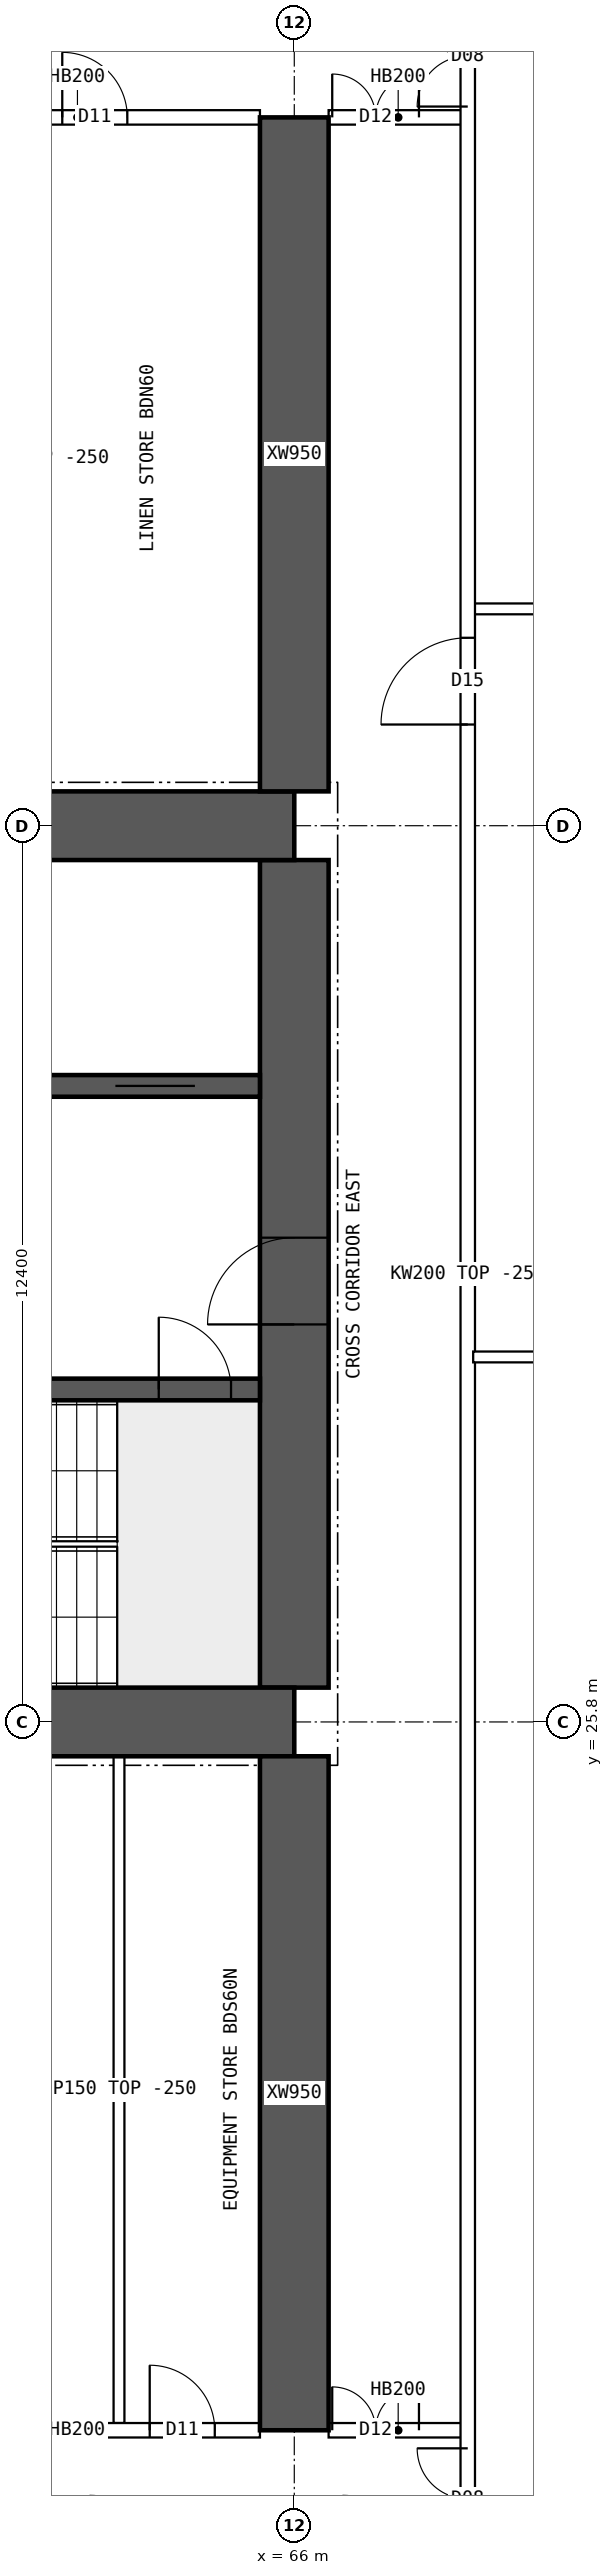
"""IFC4 building model, lengths in metres.
Left out: names, types, materials, properties, quantities, classifications, styles, units other than length and angle.
Written with IfcOpenShell. Run it as: python <this file> out.ifc"""

import sys

from ifc_helpers import new_model, si_unit, direction, frame, frame_2d, origin, place, context, subcontext, project, spatial, polyline, rectangle, outline, extrude, element, fill, save


model = new_model("IFC4")
c1 = context("Model", 3, precision=1e-05, world=origin(), true_north=direction((0.0, 1.0)))
c2 = subcontext(c1, "Body", "Model", "MODEL_VIEW")
j1 = project(units=[si_unit("LENGTHUNIT", "METRE"), si_unit("PLANEANGLEUNIT", "RADIAN")], contexts=[c1])
p1 = place(None, origin())
s1 = spatial("IfcSite", under=j1, at=p1, CompositionType="ELEMENT")
p2 = place(p1, origin())
s2 = spatial("IfcBuilding", under=s1, at=p2, CompositionType="ELEMENT")
p3 = place(p2, frame((0.0, 0.0, 88.15)))
s3 = spatial("IfcBuildingStorey", under=s2, at=p3, CompositionType="ELEMENT", Elevation=88.15)
for number, where, z_axis, x_axis in (
    (1, (18.0, 25.8, 0.0), (0.0, 0.0, 1.0), (1.0, 0.0, 0.0)),
    (2, (18.0, 38.2, 0.0), (0.0, 0.0, 1.0), (1.0, 0.0, 0.0)),
):
    element("IfcWall", number, at=place(p3, frame(where, z_axis=z_axis, x_axis=x_axis)), inside=s3, PredefinedType="SHEAR", context=c2, shape_type="SweptSolid", body=[
        extrude(rectangle(XDim=48.0, YDim=0.95, at=frame_2d((24.0, 0.0))), origin(), (0.0, 0.0, 1.0), 3.75),
    ])
p4 = place(p3, frame((66.0, 26.275, 0.0), z_axis=(0.0, 0.0, 1.0), x_axis=(0.0, 1.0, 0.0)))
e3 = element("IfcWall", 3, at=p4, inside=s3, PredefinedType="SHEAR", context=c2, shape_type="SweptSolid", body=[
    extrude(rectangle(XDim=11.45, YDim=0.95, at=frame_2d((5.725, 0.0))), origin(), (0.0, 0.0, 1.0), 3.75),
])
p5 = place(p4, frame((5.025, 0.0, 0.0)))
e4 = element("IfcOpeningElement", 4, at=p5, cuts=e3, PredefinedType="OPENING", context=c2, shape_type="SweptSolid", body=[
    extrude(rectangle(XDim=1.2, YDim=2.1, at=frame_2d((0.6, 1.05))), frame((0.0, 0.485, 0.0), z_axis=(0.0, -1.0, 0.0), x_axis=(1.0, 0.0, 0.0)), (0.0, 0.0, 1.0), 0.97),
])
p6 = place(p3, frame((18.475, 30.4, 0.0), z_axis=(0.0, 0.0, 1.0), x_axis=(1.0, 0.0, 0.0)))
e5 = element("IfcWall", 5, at=p6, inside=s3, PredefinedType="SHEAR", context=c2, shape_type="SweptSolid", body=[
    extrude(rectangle(XDim=47.05, YDim=0.3, at=frame_2d((23.525, 0.0))), origin(), (0.0, 0.0, 1.0), 3.75),
])
p7 = place(p6, frame((0.4, 0.0, 0.0)))
e6 = element("IfcOpeningElement", 6, at=p7, cuts=e5, PredefinedType="OPENING", context=c2, shape_type="SweptSolid", body=[
    extrude(rectangle(XDim=1.0, YDim=2.1, at=frame_2d((0.5, 1.05))), frame((0.0, 0.16, 0.0), z_axis=(0.0, -1.0, 0.0), x_axis=(1.0, 0.0, 0.0)), (0.0, 0.0, 1.0), 0.32),
])
p8 = place(p6, frame((45.65, 0.0, 0.0)))
e7 = element("IfcOpeningElement", 7, at=p8, cuts=e5, PredefinedType="OPENING", context=c2, shape_type="SweptSolid", body=[
    extrude(rectangle(XDim=1.0, YDim=2.1, at=frame_2d((0.5, 1.05))), frame((0.0, 0.16, 0.0), z_axis=(0.0, -1.0, 0.0), x_axis=(1.0, 0.0, 0.0)), (0.0, 0.0, 1.0), 0.32),
])
p9 = place(p6, frame((8.275, 0.0, 0.0)))
e8 = element("IfcOpeningElement", 8, at=p9, cuts=e5, PredefinedType="OPENING", context=c2, shape_type="SweptSolid", body=[
    extrude(rectangle(XDim=1.1, YDim=2.1, at=frame_2d((0.55, 1.05))), frame((0.0, 0.16, 0.0), z_axis=(0.0, -1.0, 0.0), x_axis=(1.0, 0.0, 0.0)), (0.0, 0.0, 1.0), 0.32),
])
p10 = place(p6, frame((10.875, 0.0, 0.0)))
e9 = element("IfcOpeningElement", 9, at=p10, cuts=e5, PredefinedType="OPENING", context=c2, shape_type="SweptSolid", body=[
    extrude(rectangle(XDim=1.1, YDim=2.1, at=frame_2d((0.55, 1.05))), frame((0.0, 0.16, 0.0), z_axis=(0.0, -1.0, 0.0), x_axis=(1.0, 0.0, 0.0)), (0.0, 0.0, 1.0), 0.32),
])
p11 = place(p6, frame((13.475, 0.0, 0.0)))
e10 = element("IfcOpeningElement", 10, at=p11, cuts=e5, PredefinedType="OPENING", context=c2, shape_type="SweptSolid", body=[
    extrude(rectangle(XDim=1.1, YDim=2.1, at=frame_2d((0.55, 1.05))), frame((0.0, 0.16, 0.0), z_axis=(0.0, -1.0, 0.0), x_axis=(1.0, 0.0, 0.0)), (0.0, 0.0, 1.0), 0.32),
])
p12 = place(p6, frame((16.075, 0.0, 0.0)))
e11 = element("IfcOpeningElement", 11, at=p12, cuts=e5, PredefinedType="OPENING", context=c2, shape_type="SweptSolid", body=[
    extrude(rectangle(XDim=1.1, YDim=2.1, at=frame_2d((0.55, 1.05))), frame((0.0, 0.16, 0.0), z_axis=(0.0, -1.0, 0.0), x_axis=(1.0, 0.0, 0.0)), (0.0, 0.0, 1.0), 0.32),
])
p13 = place(p6, frame((18.85, 0.0, 0.0)))
e12 = element("IfcOpeningElement", 12, at=p13, cuts=e5, PredefinedType="OPENING", context=c2, shape_type="SweptSolid", body=[
    extrude(rectangle(XDim=0.9, YDim=2.1, at=frame_2d((0.45, 1.05))), frame((0.0, 0.16, 0.0), z_axis=(0.0, -1.0, 0.0), x_axis=(1.0, 0.0, 0.0)), (0.0, 0.0, 1.0), 0.32),
])
p14 = place(p6, frame((30.142, 0.0, 0.0)))
e13 = element("IfcOpeningElement", 13, at=p14, cuts=e5, PredefinedType="OPENING", context=c2, shape_type="SweptSolid", body=[
    extrude(rectangle(XDim=1.1, YDim=2.1, at=frame_2d((0.55, 1.05))), frame((0.0, 0.16, 0.0), z_axis=(0.0, -1.0, 0.0), x_axis=(1.0, 0.0, 0.0)), (0.0, 0.0, 1.0), 0.32),
])
p15 = place(p6, frame((33.675, 0.0, 0.0)))
e14 = element("IfcOpeningElement", 14, at=p15, cuts=e5, PredefinedType="OPENING", context=c2, shape_type="SweptSolid", body=[
    extrude(rectangle(XDim=1.1, YDim=2.1, at=frame_2d((0.55, 1.05))), frame((0.0, 0.16, 0.0), z_axis=(0.0, -1.0, 0.0), x_axis=(1.0, 0.0, 0.0)), (0.0, 0.0, 1.0), 0.32),
])
p16 = place(p6, frame((37.208, 0.0, 0.0)))
e15 = element("IfcOpeningElement", 15, at=p16, cuts=e5, PredefinedType="OPENING", context=c2, shape_type="SweptSolid", body=[
    extrude(rectangle(XDim=1.1, YDim=2.1, at=frame_2d((0.55, 1.05))), frame((0.0, 0.16, 0.0), z_axis=(0.0, -1.0, 0.0), x_axis=(1.0, 0.0, 0.0)), (0.0, 0.0, 1.0), 0.32),
])
p17 = place(p3, frame((18.475, 34.6, 0.0), z_axis=(0.0, 0.0, 1.0), x_axis=(1.0, 0.0, 0.0)))
e16 = element("IfcWall", 16, at=p17, inside=s3, PredefinedType="SHEAR", context=c2, shape_type="SweptSolid", body=[
    extrude(rectangle(XDim=47.05, YDim=0.3, at=frame_2d((23.525, 0.0))), origin(), (0.0, 0.0, 1.0), 3.75),
])
p18 = place(p17, frame((0.9, 0.0, 0.0)))
e17 = element("IfcOpeningElement", 17, at=p18, cuts=e16, PredefinedType="OPENING", context=c2, shape_type="SweptSolid", body=[
    extrude(rectangle(XDim=1.1, YDim=2.1, at=frame_2d((0.55, 1.05))), frame((0.0, 0.16, 0.0), z_axis=(0.0, -1.0, 0.0), x_axis=(1.0, 0.0, 0.0)), (0.0, 0.0, 1.0), 0.32),
])
p19 = place(p17, frame((45.05, 0.0, 0.0)))
e18 = element("IfcOpeningElement", 18, at=p19, cuts=e16, PredefinedType="OPENING", context=c2, shape_type="SweptSolid", body=[
    extrude(rectangle(XDim=1.1, YDim=2.1, at=frame_2d((0.55, 1.05))), frame((0.0, 0.16, 0.0), z_axis=(0.0, -1.0, 0.0), x_axis=(1.0, 0.0, 0.0)), (0.0, 0.0, 1.0), 0.32),
])
p20 = place(p17, frame((4.125, 0.0, 0.0)))
e19 = element("IfcOpeningElement", 19, at=p20, cuts=e16, PredefinedType="OPENING", context=c2, shape_type="SweptSolid", body=[
    extrude(rectangle(XDim=0.9, YDim=2.1, at=frame_2d((0.45, 1.05))), frame((0.0, 0.16, 0.0), z_axis=(0.0, -1.0, 0.0), x_axis=(1.0, 0.0, 0.0)), (0.0, 0.0, 1.0), 0.32),
])
p21 = place(p17, frame((42.025, 0.0, 0.0)))
e20 = element("IfcOpeningElement", 20, at=p21, cuts=e16, PredefinedType="OPENING", context=c2, shape_type="SweptSolid", body=[
    extrude(rectangle(XDim=0.9, YDim=2.1, at=frame_2d((0.45, 1.05))), frame((0.0, 0.16, 0.0), z_axis=(0.0, -1.0, 0.0), x_axis=(1.0, 0.0, 0.0)), (0.0, 0.0, 1.0), 0.32),
])
p22 = place(p17, frame((8.9, 0.0, 0.0)))
e21 = element("IfcOpeningElement", 21, at=p22, cuts=e16, PredefinedType="OPENING", context=c2, shape_type="SweptSolid", body=[
    extrude(rectangle(XDim=0.9, YDim=2.1, at=frame_2d((0.45, 1.05))), frame((0.0, 0.16, 0.0), z_axis=(0.0, -1.0, 0.0), x_axis=(1.0, 0.0, 0.0)), (0.0, 0.0, 1.0), 0.32),
])
p23 = place(p17, frame((12.874, 0.0, 0.0)))
e22 = element("IfcOpeningElement", 22, at=p23, cuts=e16, PredefinedType="OPENING", context=c2, shape_type="SweptSolid", body=[
    extrude(rectangle(XDim=0.9, YDim=2.1, at=frame_2d((0.45, 1.05))), frame((0.0, 0.16, 0.0), z_axis=(0.0, -1.0, 0.0), x_axis=(1.0, 0.0, 0.0)), (0.0, 0.0, 1.0), 0.32),
])
p24 = place(p17, frame((16.521, 0.0, 0.0)))
e23 = element("IfcOpeningElement", 23, at=p24, cuts=e16, PredefinedType="OPENING", context=c2, shape_type="SweptSolid", body=[
    extrude(rectangle(XDim=0.9, YDim=2.1, at=frame_2d((0.45, 1.05))), frame((0.0, 0.16, 0.0), z_axis=(0.0, -1.0, 0.0), x_axis=(1.0, 0.0, 0.0)), (0.0, 0.0, 1.0), 0.32),
])
p25 = place(p17, frame((20.28, 0.0, 0.0)))
e24 = element("IfcOpeningElement", 24, at=p25, cuts=e16, PredefinedType="OPENING", context=c2, shape_type="SweptSolid", body=[
    extrude(rectangle(XDim=0.9, YDim=2.1, at=frame_2d((0.45, 1.05))), frame((0.0, 0.16, 0.0), z_axis=(0.0, -1.0, 0.0), x_axis=(1.0, 0.0, 0.0)), (0.0, 0.0, 1.0), 0.32),
])
p26 = place(p17, frame((24.686, 0.0, 0.0)))
e25 = element("IfcOpeningElement", 25, at=p26, cuts=e16, PredefinedType="OPENING", context=c2, shape_type="SweptSolid", body=[
    extrude(rectangle(XDim=0.9, YDim=2.1, at=frame_2d((0.45, 1.05))), frame((0.0, 0.16, 0.0), z_axis=(0.0, -1.0, 0.0), x_axis=(1.0, 0.0, 0.0)), (0.0, 0.0, 1.0), 0.32),
])
p27 = place(p17, frame((27.483, 0.0, 0.0)))
e26 = element("IfcOpeningElement", 26, at=p27, cuts=e16, PredefinedType="OPENING", context=c2, shape_type="SweptSolid", body=[
    extrude(rectangle(XDim=0.9, YDim=2.1, at=frame_2d((0.45, 1.05))), frame((0.0, 0.16, 0.0), z_axis=(0.0, -1.0, 0.0), x_axis=(1.0, 0.0, 0.0)), (0.0, 0.0, 1.0), 0.32),
])
p28 = place(p17, frame((33.604, 0.0, 0.0)))
e27 = element("IfcOpeningElement", 27, at=p28, cuts=e16, PredefinedType="OPENING", context=c2, shape_type="SweptSolid", body=[
    extrude(rectangle(XDim=0.9, YDim=2.1, at=frame_2d((0.45, 1.05))), frame((0.0, 0.16, 0.0), z_axis=(0.0, -1.0, 0.0), x_axis=(1.0, 0.0, 0.0)), (0.0, 0.0, 1.0), 0.32),
])
for number, where, z_axis, x_axis in (
    (28, (66.0, 16.0, 0.0), (0.0, 0.0, 1.0), (0.0, 1.0, 0.0)),
    (29, (66.0, 38.675, 0.0), (0.0, 0.0, 1.0), (0.0, 1.0, 0.0)),
):
    element("IfcWall", number, at=place(p3, frame(where, z_axis=z_axis, x_axis=x_axis)), inside=s3, PredefinedType="SHEAR", context=c2, shape_type="SweptSolid", body=[
        extrude(rectangle(XDim=9.325, YDim=0.95, at=frame_2d((4.663, 0.0))), origin(), (0.0, 0.0, 1.0), 3.75),
    ])
p29 = place(p3, frame((60.475, 16.0, 0.0), z_axis=(0.0, 0.0, 1.0), x_axis=(1.0, 0.0, 0.0)))
e30 = element("IfcWall", 30, at=p29, inside=s3, PredefinedType="SOLIDWALL", context=c2, shape_type="SweptSolid", body=[
    extrude(rectangle(XDim=5.05, YDim=0.2, at=frame_2d((2.525, 0.0))), origin(), (0.0, 0.0, 1.0), 3.5),
])
p30 = place(p29, frame((0.15, 0.0, 0.0)))
e31 = element("IfcOpeningElement", 31, at=p30, cuts=e30, PredefinedType="OPENING", context=c2, shape_type="SweptSolid", body=[
    extrude(rectangle(XDim=0.9, YDim=2.1, at=frame_2d((0.45, 1.05))), frame((0.0, 0.11, 0.0), z_axis=(0.0, -1.0, 0.0), x_axis=(1.0, 0.0, 0.0)), (0.0, 0.0, 1.0), 0.22),
])
p31 = place(p29, frame((3.525, 0.0, 0.0)))
e32 = element("IfcOpeningElement", 32, at=p31, cuts=e30, PredefinedType="OPENING", context=c2, shape_type="SweptSolid", body=[
    extrude(rectangle(XDim=0.9, YDim=2.1, at=frame_2d((0.45, 1.05))), frame((0.0, 0.11, 0.0), z_axis=(0.0, -1.0, 0.0), x_axis=(1.0, 0.0, 0.0)), (0.0, 0.0, 1.0), 0.22),
])
p32 = place(p3, frame((66.475, 16.0, 0.0), z_axis=(0.0, 0.0, 1.0), x_axis=(1.0, 0.0, 0.0)))
e33 = element("IfcWall", 33, at=p32, inside=s3, PredefinedType="SOLIDWALL", context=c2, shape_type="SweptSolid", body=[
    extrude(rectangle(XDim=1.925, YDim=0.2, at=frame_2d((0.962, 0.0))), origin(), (0.0, 0.0, 1.0), 3.5),
])
p33 = place(p32, frame((0.05, 0.0, 0.0)))
e34 = element("IfcOpeningElement", 34, at=p33, cuts=e33, PredefinedType="OPENING", context=c2, shape_type="SweptSolid", body=[
    extrude(rectangle(XDim=1.2, YDim=2.1, at=frame_2d((0.6, 1.05))), frame((0.0, 0.11, 0.0), z_axis=(0.0, -1.0, 0.0), x_axis=(1.0, 0.0, 0.0)), (0.0, 0.0, 1.0), 0.22),
])
p34 = place(p3, frame((60.475, 48.0, 0.0), z_axis=(0.0, 0.0, 1.0), x_axis=(1.0, 0.0, 0.0)))
e35 = element("IfcWall", 35, at=p34, inside=s3, PredefinedType="SOLIDWALL", context=c2, shape_type="SweptSolid", body=[
    extrude(rectangle(XDim=5.05, YDim=0.2, at=frame_2d((2.525, 0.0))), origin(), (0.0, 0.0, 1.0), 3.5),
])
p35 = place(p34, frame((0.15, 0.0, 0.0)))
e36 = element("IfcOpeningElement", 36, at=p35, cuts=e35, PredefinedType="OPENING", context=c2, shape_type="SweptSolid", body=[
    extrude(rectangle(XDim=0.9, YDim=2.1, at=frame_2d((0.45, 1.05))), frame((0.0, 0.11, 0.0), z_axis=(0.0, -1.0, 0.0), x_axis=(1.0, 0.0, 0.0)), (0.0, 0.0, 1.0), 0.22),
])
p36 = place(p34, frame((2.315, 0.0, 0.0)))
e37 = element("IfcOpeningElement", 37, at=p36, cuts=e35, PredefinedType="OPENING", context=c2, shape_type="SweptSolid", body=[
    extrude(rectangle(XDim=0.9, YDim=2.1, at=frame_2d((0.45, 1.05))), frame((0.0, 0.11, 0.0), z_axis=(0.0, -1.0, 0.0), x_axis=(1.0, 0.0, 0.0)), (0.0, 0.0, 1.0), 0.22),
])
p37 = place(p3, frame((66.475, 48.0, 0.0), z_axis=(0.0, 0.0, 1.0), x_axis=(1.0, 0.0, 0.0)))
e38 = element("IfcWall", 38, at=p37, inside=s3, PredefinedType="SOLIDWALL", context=c2, shape_type="SweptSolid", body=[
    extrude(rectangle(XDim=1.925, YDim=0.2, at=frame_2d((0.962, 0.0))), origin(), (0.0, 0.0, 1.0), 3.5),
])
p38 = place(p37, frame((0.05, 0.0, 0.0)))
e39 = element("IfcOpeningElement", 39, at=p38, cuts=e38, PredefinedType="OPENING", context=c2, shape_type="SweptSolid", body=[
    extrude(rectangle(XDim=1.2, YDim=2.1, at=frame_2d((0.6, 1.05))), frame((0.0, 0.11, 0.0), z_axis=(0.0, -1.0, 0.0), x_axis=(1.0, 0.0, 0.0)), (0.0, 0.0, 1.0), 0.22),
])
p39 = place(p3, frame((63.575, 16.1, 0.0), z_axis=(0.0, 0.0, 1.0), x_axis=(0.0, 1.0, 0.0)))
e40 = element("IfcWall", 40, at=p39, inside=s3, PredefinedType="PARTITIONING", context=c2, shape_type="SweptSolid", body=[
    extrude(rectangle(XDim=9.225, YDim=0.15, at=frame_2d((4.612, 0.0))), origin(), (0.0, 0.0, 1.0), 3.5),
])
p40 = place(p3, frame((68.475, 30.85, 0.0), z_axis=(0.0, 0.0, 1.0), x_axis=(1.0, 0.0, 0.0)))
e41 = element("IfcWall", 41, at=p40, inside=s3, PredefinedType="PARTITIONING", context=c2, shape_type="SweptSolid", body=[
    extrude(outline(polyline([(0.0, 0.0), (6.82, 0.0), (6.82, 3.5), (3.827, 3.5), (3.825, 3.05), (3.227, 3.05), (3.225, 3.5), (0.0, 3.5), (0.0, 0.0)])), frame((0.0, 0.075, 0.0), z_axis=(0.0, -1.0, 0.0), x_axis=(1.0, 0.0, 0.0)), (0.0, 0.0, 1.0), 0.15),
])
p41 = place(p3, frame((68.4, 9.405, 0.0), z_axis=(0.0, 0.0, 1.0), x_axis=(0.0, 1.0, 0.0)))
e42 = element("IfcWall", 42, at=p41, inside=s3, PredefinedType="SOLIDWALL", context=c2, shape_type="SweptSolid", body=[
    extrude(rectangle(XDim=45.189, YDim=0.2, at=frame_2d((22.595, 0.0))), origin(), (0.0, 0.0, 1.0), 3.5),
])
p42 = place(p41, frame((30.195, 0.0, 0.0)))
e43 = element("IfcOpeningElement", 43, at=p42, cuts=e42, PredefinedType="OPENING", context=c2, shape_type="SweptSolid", body=[
    extrude(rectangle(XDim=1.2, YDim=2.1, at=frame_2d((0.6, 1.05))), frame((0.0, 0.11, 0.0), z_axis=(0.0, -1.0, 0.0), x_axis=(1.0, 0.0, 0.0)), (0.0, 0.0, 1.0), 0.22),
])
p43 = place(p41, frame((4.945, 0.0, 0.0)))
e44 = element("IfcOpeningElement", 44, at=p43, cuts=e42, PredefinedType="OPENING", context=c2, shape_type="SweptSolid", body=[
    extrude(rectangle(XDim=1.4, YDim=2.1, at=frame_2d((0.7, 1.05))), frame((0.0, 0.11, 0.0), z_axis=(0.0, -1.0, 0.0), x_axis=(1.0, 0.0, 0.0)), (0.0, 0.0, 1.0), 0.22),
])
p44 = place(p41, frame((38.745, 0.0, 0.0)))
e45 = element("IfcOpeningElement", 45, at=p44, cuts=e42, PredefinedType="OPENING", context=c2, shape_type="SweptSolid", body=[
    extrude(rectangle(XDim=1.4, YDim=2.1, at=frame_2d((0.7, 1.05))), frame((0.0, 0.11, 0.0), z_axis=(0.0, -1.0, 0.0), x_axis=(1.0, 0.0, 0.0)), (0.0, 0.0, 1.0), 0.22),
])
p45 = place(p3, frame((68.475, 41.2, 0.0), z_axis=(0.0, 0.0, 1.0), x_axis=(1.0, 0.0, 0.0)))
e46 = element("IfcWall", 46, at=p45, inside=s3, PredefinedType="PARTITIONING", context=c2, shape_type="SweptSolid", body=[
    extrude(outline(polyline([(0.0, 0.0), (6.82, 0.0), (6.82, 3.5), (3.827, 3.5), (3.825, 3.05), (3.227, 3.05), (3.225, 3.5), (0.0, 3.5), (0.0, 0.0)])), frame((0.0, 0.075, 0.0), z_axis=(0.0, -1.0, 0.0), x_axis=(1.0, 0.0, 0.0)), (0.0, 0.0, 1.0), 0.15),
])
p46 = place(p5, origin())
e47 = element("IfcDoor", 47, at=p46, inside=s3, OperationType="SINGLE_SWING_LEFT", PredefinedType="DOOR", context=c2, shape_type="SweptSolid", body=[
    extrude(rectangle(XDim=1.2, YDim=2.1, at=frame_2d((0.6, 1.05))), frame((0.0, 0.025, 0.0), z_axis=(0.0, -1.0, 0.0), x_axis=(1.0, 0.0, 0.0)), (0.0, 0.0, 1.0), 0.05),
])
fill(e4, e47)
p47 = place(p8, origin())
e48 = element("IfcDoor", 48, at=p47, inside=s3, OperationType="SINGLE_SWING_LEFT", PredefinedType="DOOR", context=c2, shape_type="SweptSolid", body=[
    extrude(rectangle(XDim=1.0, YDim=2.1, at=frame_2d((0.5, 1.05))), frame((0.0, 0.025, 0.0), z_axis=(0.0, -1.0, 0.0), x_axis=(1.0, 0.0, 0.0)), (0.0, 0.0, 1.0), 0.05),
])
fill(e7, e48)
p48 = place(p19, origin())
e49 = element("IfcDoor", 49, at=p48, inside=s3, OperationType="DOUBLE_DOOR_SLIDING", PredefinedType="DOOR", context=c2, shape_type="SweptSolid", body=[
    extrude(rectangle(XDim=1.1, YDim=2.1, at=frame_2d((0.55, 1.05))), frame((0.0, 0.025, 0.0), z_axis=(0.0, -1.0, 0.0), x_axis=(1.0, 0.0, 0.0)), (0.0, 0.0, 1.0), 0.05),
])
fill(e18, e49)
p49 = place(p33, origin())
e50 = element("IfcDoor", 50, at=p49, inside=s3, OperationType="DOUBLE_DOOR_SINGLE_SWING", PredefinedType="DOOR", context=c2, shape_type="SweptSolid", body=[
    extrude(rectangle(XDim=1.2, YDim=2.1, at=frame_2d((0.6, 1.05))), frame((0.0, 0.025, 0.0), z_axis=(0.0, -1.0, 0.0), x_axis=(1.0, 0.0, 0.0)), (0.0, 0.0, 1.0), 0.05),
])
fill(e34, e50)
p50 = place(p38, origin())
e51 = element("IfcDoor", 51, at=p50, inside=s3, OperationType="DOUBLE_DOOR_SINGLE_SWING", PredefinedType="DOOR", context=c2, shape_type="SweptSolid", body=[
    extrude(rectangle(XDim=1.2, YDim=2.1, at=frame_2d((0.6, 1.05))), frame((0.0, 0.025, 0.0), z_axis=(0.0, -1.0, 0.0), x_axis=(1.0, 0.0, 0.0)), (0.0, 0.0, 1.0), 0.05),
])
fill(e39, e51)
p51 = place(p31, origin())
e52 = element("IfcDoor", 52, at=p51, inside=s3, OperationType="SINGLE_SWING_LEFT", PredefinedType="DOOR", context=c2, shape_type="SweptSolid", body=[
    extrude(rectangle(XDim=0.9, YDim=2.1, at=frame_2d((0.45, 1.05))), frame((0.0, 0.025, 0.0), z_axis=(0.0, -1.0, 0.0), x_axis=(1.0, 0.0, 0.0)), (0.0, 0.0, 1.0), 0.05),
])
fill(e32, e52)
p52 = place(p36, origin())
e53 = element("IfcDoor", 53, at=p52, inside=s3, OperationType="SINGLE_SWING_LEFT", PredefinedType="DOOR", context=c2, shape_type="SweptSolid", body=[
    extrude(rectangle(XDim=0.9, YDim=2.1, at=frame_2d((0.45, 1.05))), frame((0.0, 0.025, 0.0), z_axis=(0.0, -1.0, 0.0), x_axis=(1.0, 0.0, 0.0)), (0.0, 0.0, 1.0), 0.05),
])
fill(e37, e53)
p53 = place(p42, origin())
e54 = element("IfcDoor", 54, at=p53, inside=s3, OperationType="SINGLE_SWING_LEFT", PredefinedType="DOOR", context=c2, shape_type="SweptSolid", body=[
    extrude(rectangle(XDim=1.2, YDim=2.1, at=frame_2d((0.6, 1.05))), frame((0.0, 0.025, 0.0), z_axis=(0.0, -1.0, 0.0), x_axis=(1.0, 0.0, 0.0)), (0.0, 0.0, 1.0), 0.05),
])
fill(e43, e54)
p54 = place(p43, origin())
e55 = element("IfcDoor", 55, at=p54, inside=s3, OperationType="DOUBLE_DOOR_SINGLE_SWING", PredefinedType="DOOR", context=c2, shape_type="SweptSolid", body=[
    extrude(rectangle(XDim=1.4, YDim=2.1, at=frame_2d((0.7, 1.05))), frame((0.0, 0.025, 0.0), z_axis=(0.0, -1.0, 0.0), x_axis=(1.0, 0.0, 0.0)), (0.0, 0.0, 1.0), 0.05),
])
fill(e44, e55)
p55 = place(p44, origin())
e56 = element("IfcDoor", 56, at=p55, inside=s3, OperationType="DOUBLE_DOOR_SINGLE_SWING", PredefinedType="DOOR", context=c2, shape_type="SweptSolid", body=[
    extrude(rectangle(XDim=1.4, YDim=2.1, at=frame_2d((0.7, 1.05))), frame((0.0, 0.025, 0.0), z_axis=(0.0, -1.0, 0.0), x_axis=(1.0, 0.0, 0.0)), (0.0, 0.0, 1.0), 0.05),
])
fill(e45, e56)
save(model, sys.argv[1])
